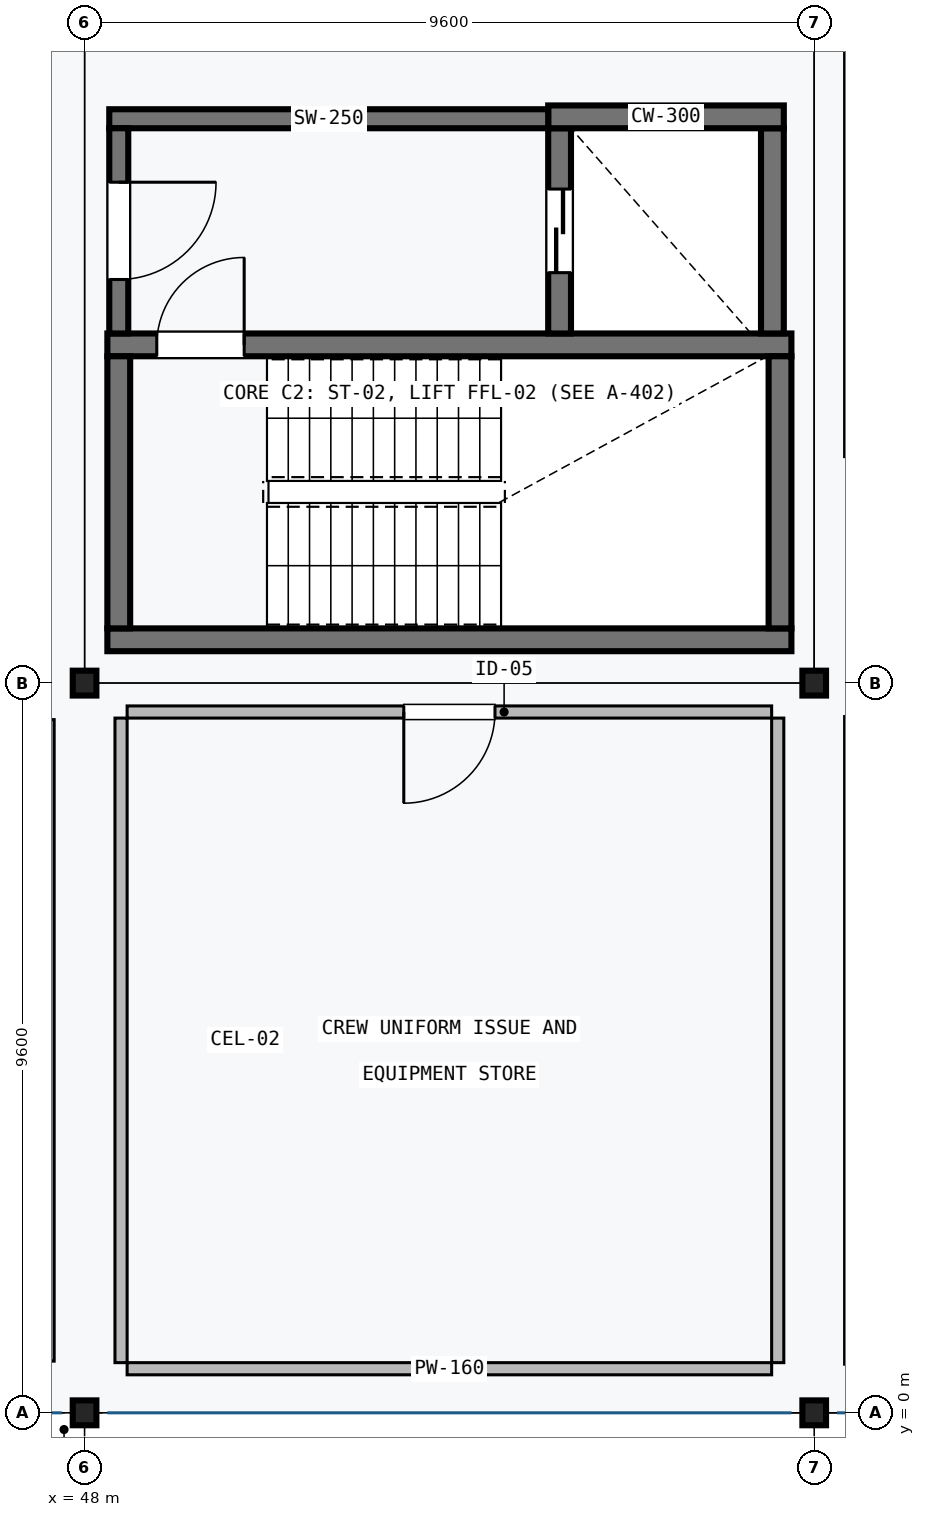
"""IFC4 building model, lengths in metres.
Left out: names, types, materials, properties, quantities, classifications, styles, units other than length and angle.
Written with IfcOpenShell. Run it as: python <this file> out.ifc"""

import sys

from ifc_helpers import new_model, si_unit, direction, frame, frame_2d, origin, origin_2d, place, context, subcontext, project, spatial, rectangle, i_section, extrude, element, fill, save


model = new_model("IFC4")
c1 = context("Model", 3, precision=1e-05, world=origin(), true_north=direction((0.0, 1.0)))
c2 = subcontext(c1, "Body", "Model", "MODEL_VIEW")
j1 = project(units=[si_unit("LENGTHUNIT", "METRE"), si_unit("PLANEANGLEUNIT", "RADIAN")], contexts=[c1])
p1 = place(None, origin())
s1 = spatial("IfcSite", under=j1, at=p1, CompositionType="ELEMENT")
p2 = place(p1, origin())
s2 = spatial("IfcBuilding", under=s1, at=p2, CompositionType="ELEMENT")
p3 = place(p2, frame((0.0, 0.0, 14.7)))
s3 = spatial("IfcBuildingStorey", under=s2, at=p3, CompositionType="ELEMENT", Elevation=14.7)
for number, where, z_axis, x_axis in (
    (1, (48.0, 0.0, 0.0), (0.0, 0.0, 1.0), (1.0, 0.0, 0.0)),
    (2, (48.0, 9.6, 0.0), (0.0, 0.0, 1.0), (1.0, 0.0, 0.0)),
    (3, (57.6, 0.0, 0.0), (0.0, 0.0, 1.0), (1.0, 0.0, 0.0)),
    (4, (57.6, 9.6, 0.0), (0.0, 0.0, 1.0), (1.0, 0.0, 0.0)),
):
    element("IfcColumn", number, at=place(p3, frame(where, z_axis=z_axis, x_axis=x_axis)), inside=s3, PredefinedType="COLUMN", context=c2, shape_type="SweptSolid", body=[
        extrude(i_section(OverallWidth=0.311, OverallDepth=0.327, WebThickness=0.016, FlangeThickness=0.025, FilletRadius=0.015, at=origin_2d()), origin(), (0.0, 0.0, 1.0), 3.95),
    ])
p4 = place(p3, frame((48.3, 10.17, 0.0), z_axis=(0.0, 0.0, 1.0), x_axis=(1.0, 0.0, 0.0)))
e5 = element("IfcWall", 5, at=p4, inside=s3, PredefinedType="SHEAR", context=c2, shape_type="SweptSolid", body=[
    extrude(rectangle(XDim=9.0, YDim=0.3, at=frame_2d((4.5, 0.0))), origin(), (0.0, 0.0, 1.0), 3.95),
])
p5 = place(p3, frame((57.3, 14.05, 0.0), z_axis=(0.0, 0.0, 1.0), x_axis=(-1.0, 0.0, 0.0)))
e6 = element("IfcWall", 6, at=p5, inside=s3, PredefinedType="SHEAR", context=c2, shape_type="SweptSolid", body=[
    extrude(rectangle(XDim=9.0, YDim=0.3, at=frame_2d((4.5, 0.0))), origin(), (0.0, 0.0, 1.0), 3.95),
])
p6 = place(p5, frame((7.2, 0.0, 0.0)))
e7 = element("IfcOpeningElement", 7, at=p6, cuts=e6, PredefinedType="OPENING", context=c2, shape_type="SweptSolid", body=[
    extrude(rectangle(XDim=1.15, YDim=2.15, at=frame_2d((0.575, 1.075))), frame((0.0, 0.16, 0.0), z_axis=(0.0, -1.0, 0.0), x_axis=(1.0, 0.0, 0.0)), (0.0, 0.0, 1.0), 0.32),
])
for number, where, z_axis, x_axis in (
    (8, (48.45, 10.32, 0.0), (0.0, 0.0, 1.0), (0.0, 1.0, 0.0)),
    (9, (57.15, 13.9, 0.0), (0.0, 0.0, 1.0), (0.0, -1.0, 0.0)),
):
    element("IfcWall", number, at=place(p3, frame(where, z_axis=z_axis, x_axis=x_axis)), inside=s3, PredefinedType="SHEAR", context=c2, shape_type="SweptSolid", body=[
        extrude(rectangle(XDim=3.58, YDim=0.3, at=frame_2d((1.79, 0.0))), origin(), (0.0, 0.0, 1.0), 3.95),
    ])
p7 = place(p3, frame((54.25, 16.9, 0.0), z_axis=(0.0, 0.0, 1.0), x_axis=(0.0, -1.0, 0.0)))
e10 = element("IfcWall", 10, at=p7, inside=s3, PredefinedType="SHEAR", context=c2, shape_type="SweptSolid", body=[
    extrude(rectangle(XDim=2.7, YDim=0.3, at=frame_2d((1.35, 0.0))), origin(), (0.0, 0.0, 1.0), 3.95),
])
p8 = place(p7, frame((0.8, 0.0, 0.0)))
e11 = element("IfcOpeningElement", 11, at=p8, cuts=e10, PredefinedType="OPENING", context=c2, shape_type="SweptSolid", body=[
    extrude(rectangle(XDim=1.1, YDim=2.1, at=frame_2d((0.55, 1.05))), frame((0.0, 0.16, 0.0), z_axis=(0.0, -1.0, 0.0), x_axis=(1.0, 0.0, 0.0)), (0.0, 0.0, 1.0), 0.32),
])
p9 = place(p3, frame((57.05, 14.2, 0.0), z_axis=(0.0, 0.0, 1.0), x_axis=(0.0, 1.0, 0.0)))
e12 = element("IfcWall", 12, at=p9, inside=s3, PredefinedType="SHEAR", context=c2, shape_type="SweptSolid", body=[
    extrude(rectangle(XDim=2.7, YDim=0.3, at=frame_2d((1.35, 0.0))), origin(), (0.0, 0.0, 1.0), 3.95),
])
p10 = place(p3, frame((54.1, 17.05, 0.0), z_axis=(0.0, 0.0, 1.0), x_axis=(1.0, 0.0, 0.0)))
e13 = element("IfcWall", 13, at=p10, inside=s3, PredefinedType="SHEAR", context=c2, shape_type="SweptSolid", body=[
    extrude(rectangle(XDim=3.1, YDim=0.3, at=frame_2d((1.55, 0.0))), origin(), (0.0, 0.0, 1.0), 3.95),
])
p11 = place(p3, frame((54.1, 17.025, 0.0), z_axis=(0.0, 0.0, 1.0), x_axis=(-1.0, 0.0, 0.0)))
e14 = element("IfcWall", 14, at=p11, inside=s3, PredefinedType="SHEAR", context=c2, shape_type="SweptSolid", body=[
    extrude(rectangle(XDim=5.775, YDim=0.25, at=frame_2d((2.888, 0.0))), origin(), (0.0, 0.0, 1.0), 3.95),
])
p12 = place(p3, frame((48.45, 14.2, 0.0), z_axis=(0.0, 0.0, 1.0), x_axis=(0.0, 1.0, 0.0)))
e15 = element("IfcWall", 15, at=p12, inside=s3, PredefinedType="SHEAR", context=c2, shape_type="SweptSolid", body=[
    extrude(rectangle(XDim=2.7, YDim=0.25, at=frame_2d((1.35, 0.0))), origin(), (0.0, 0.0, 1.0), 3.95),
])
p13 = place(p12, frame((0.71, 0.0, 0.0)))
e16 = element("IfcOpeningElement", 16, at=p13, cuts=e15, PredefinedType="OPENING", context=c2, shape_type="SweptSolid", body=[
    extrude(rectangle(XDim=1.28, YDim=2.2, at=frame_2d((0.64, 1.1))), frame((0.0, 0.135, 0.0), z_axis=(0.0, -1.0, 0.0), x_axis=(1.0, 0.0, 0.0)), (0.0, 0.0, 1.0), 0.27),
])
p14 = place(p3, frame((47.51, 9.12, 0.0), z_axis=(0.0, 0.0, 1.0), x_axis=(0.0, -1.0, 0.0)))
e17 = element("IfcWall", 17, at=p14, inside=s3, PredefinedType="PARTITIONING", context=c2, shape_type="SweptSolid", body=[
    extrude(rectangle(XDim=8.44, YDim=0.18, at=frame_2d((4.22, 0.0))), origin(), (0.0, 0.0, 1.0), 3.59),
])
p15 = place(p3, frame((58.07, 0.64, 0.0), z_axis=(0.0, 0.0, 1.0), x_axis=(0.0, 1.0, 0.0)))
e18 = element("IfcWall", 18, at=p15, inside=s3, PredefinedType="PARTITIONING", context=c2, shape_type="SweptSolid", body=[
    extrude(rectangle(XDim=8.52, YDim=0.14, at=frame_2d((4.26, 0.0))), origin(), (0.0, 0.0, 1.0), 3.59),
])
p16 = place(p3, frame((58.09, 12.58, 0.0), z_axis=(0.0, 0.0, 1.0), x_axis=(0.0, 1.0, 0.0)))
e19 = element("IfcWall", 19, at=p16, inside=s3, PredefinedType="PARTITIONING", context=c2, shape_type="SweptSolid", body=[
    extrude(rectangle(XDim=6.14, YDim=0.18, at=frame_2d((3.07, 0.0))), origin(), (0.0, 0.0, 1.0), 3.59),
])
p17 = place(p3, frame((57.04, 0.58, 0.0), z_axis=(0.0, 0.0, 1.0), x_axis=(-1.0, 0.0, 0.0)))
e20 = element("IfcWall", 20, at=p17, inside=s3, PredefinedType="PARTITIONING", context=c2, shape_type="SweptSolid", body=[
    extrude(rectangle(XDim=8.48, YDim=0.16, at=frame_2d((4.24, 0.0))), origin(), (0.0, 0.0, 1.0), 3.59),
])
p18 = place(p3, frame((48.56, 9.22, 0.0), z_axis=(0.0, 0.0, 1.0), x_axis=(1.0, 0.0, 0.0)))
e21 = element("IfcWall", 21, at=p18, inside=s3, PredefinedType="PARTITIONING", context=c2, shape_type="SweptSolid", body=[
    extrude(rectangle(XDim=8.48, YDim=0.16, at=frame_2d((4.24, 0.0))), origin(), (0.0, 0.0, 1.0), 3.59),
])
p19 = place(p18, frame((3.64, 0.0, 0.0)))
e22 = element("IfcOpeningElement", 22, at=p19, cuts=e21, PredefinedType="OPENING", context=c2, shape_type="SweptSolid", body=[
    extrude(rectangle(XDim=1.2, YDim=2.2, at=frame_2d((0.6, 1.1))), frame((0.0, 0.09, 0.0), z_axis=(0.0, -1.0, 0.0), x_axis=(1.0, 0.0, 0.0)), (0.0, 0.0, 1.0), 0.18),
])
for number, where, z_axis, x_axis in (
    (23, (48.48, 0.66, 0.0), (0.0, 0.0, 1.0), (0.0, 1.0, 0.0)),
    (24, (57.12, 9.14, 0.0), (0.0, 0.0, 1.0), (0.0, -1.0, 0.0)),
):
    element("IfcWall", number, at=place(p3, frame(where, z_axis=z_axis, x_axis=x_axis)), inside=s3, PredefinedType="PARTITIONING", context=c2, shape_type="SweptSolid", body=[
        extrude(rectangle(XDim=8.48, YDim=0.16, at=frame_2d((4.24, 0.0))), origin(), (0.0, 0.0, 1.0), 3.59),
    ])
p20 = place(p6, frame((1.15, 0.0, 0.0), z_axis=(0.0, 0.0, 1.0), x_axis=(-1.0, 0.0, 0.0)))
e25 = element("IfcDoor", 25, at=p20, inside=s3, OperationType="SINGLE_SWING_LEFT", PredefinedType="DOOR", context=c2, shape_type="SweptSolid", body=[
    extrude(rectangle(XDim=1.15, YDim=2.15, at=frame_2d((0.575, 1.075))), frame((0.0, 0.025, 0.0), z_axis=(0.0, -1.0, 0.0), x_axis=(1.0, 0.0, 0.0)), (0.0, 0.0, 1.0), 0.05),
])
fill(e7, e25)
p21 = place(p8, frame((1.1, 0.0, 0.0), z_axis=(0.0, 0.0, 1.0), x_axis=(-1.0, 0.0, 0.0)))
e26 = element("IfcDoor", 26, at=p21, inside=s3, OperationType="DOUBLE_DOOR_SLIDING", PredefinedType="DOOR", context=c2, shape_type="SweptSolid", body=[
    extrude(rectangle(XDim=1.1, YDim=2.1, at=frame_2d((0.55, 1.05))), frame((0.0, 0.025, 0.0), z_axis=(0.0, -1.0, 0.0), x_axis=(1.0, 0.0, 0.0)), (0.0, 0.0, 1.0), 0.05),
])
fill(e11, e26)
p22 = place(p13, frame((1.28, 0.0, 0.0), z_axis=(0.0, 0.0, 1.0), x_axis=(-1.0, 0.0, 0.0)))
e27 = element("IfcDoor", 27, at=p22, inside=s3, OperationType="SINGLE_SWING_RIGHT", PredefinedType="DOOR", context=c2, shape_type="SweptSolid", body=[
    extrude(rectangle(XDim=1.28, YDim=2.2, at=frame_2d((0.64, 1.1))), frame((0.0, 0.025, 0.0), z_axis=(0.0, -1.0, 0.0), x_axis=(1.0, 0.0, 0.0)), (0.0, 0.0, 1.0), 0.05),
])
fill(e16, e27)
p23 = place(p19, frame((1.2, 0.0, 0.0), z_axis=(0.0, 0.0, 1.0), x_axis=(-1.0, 0.0, 0.0)))
e28 = element("IfcDoor", 28, at=p23, inside=s3, OperationType="SINGLE_SWING_LEFT", PredefinedType="DOOR", context=c2, shape_type="SweptSolid", body=[
    extrude(rectangle(XDim=1.2, YDim=2.2, at=frame_2d((0.6, 1.1))), frame((0.0, 0.025, 0.0), z_axis=(0.0, -1.0, 0.0), x_axis=(1.0, 0.0, 0.0)), (0.0, 0.0, 1.0), 0.05),
])
fill(e22, e28)
save(model, sys.argv[1])
